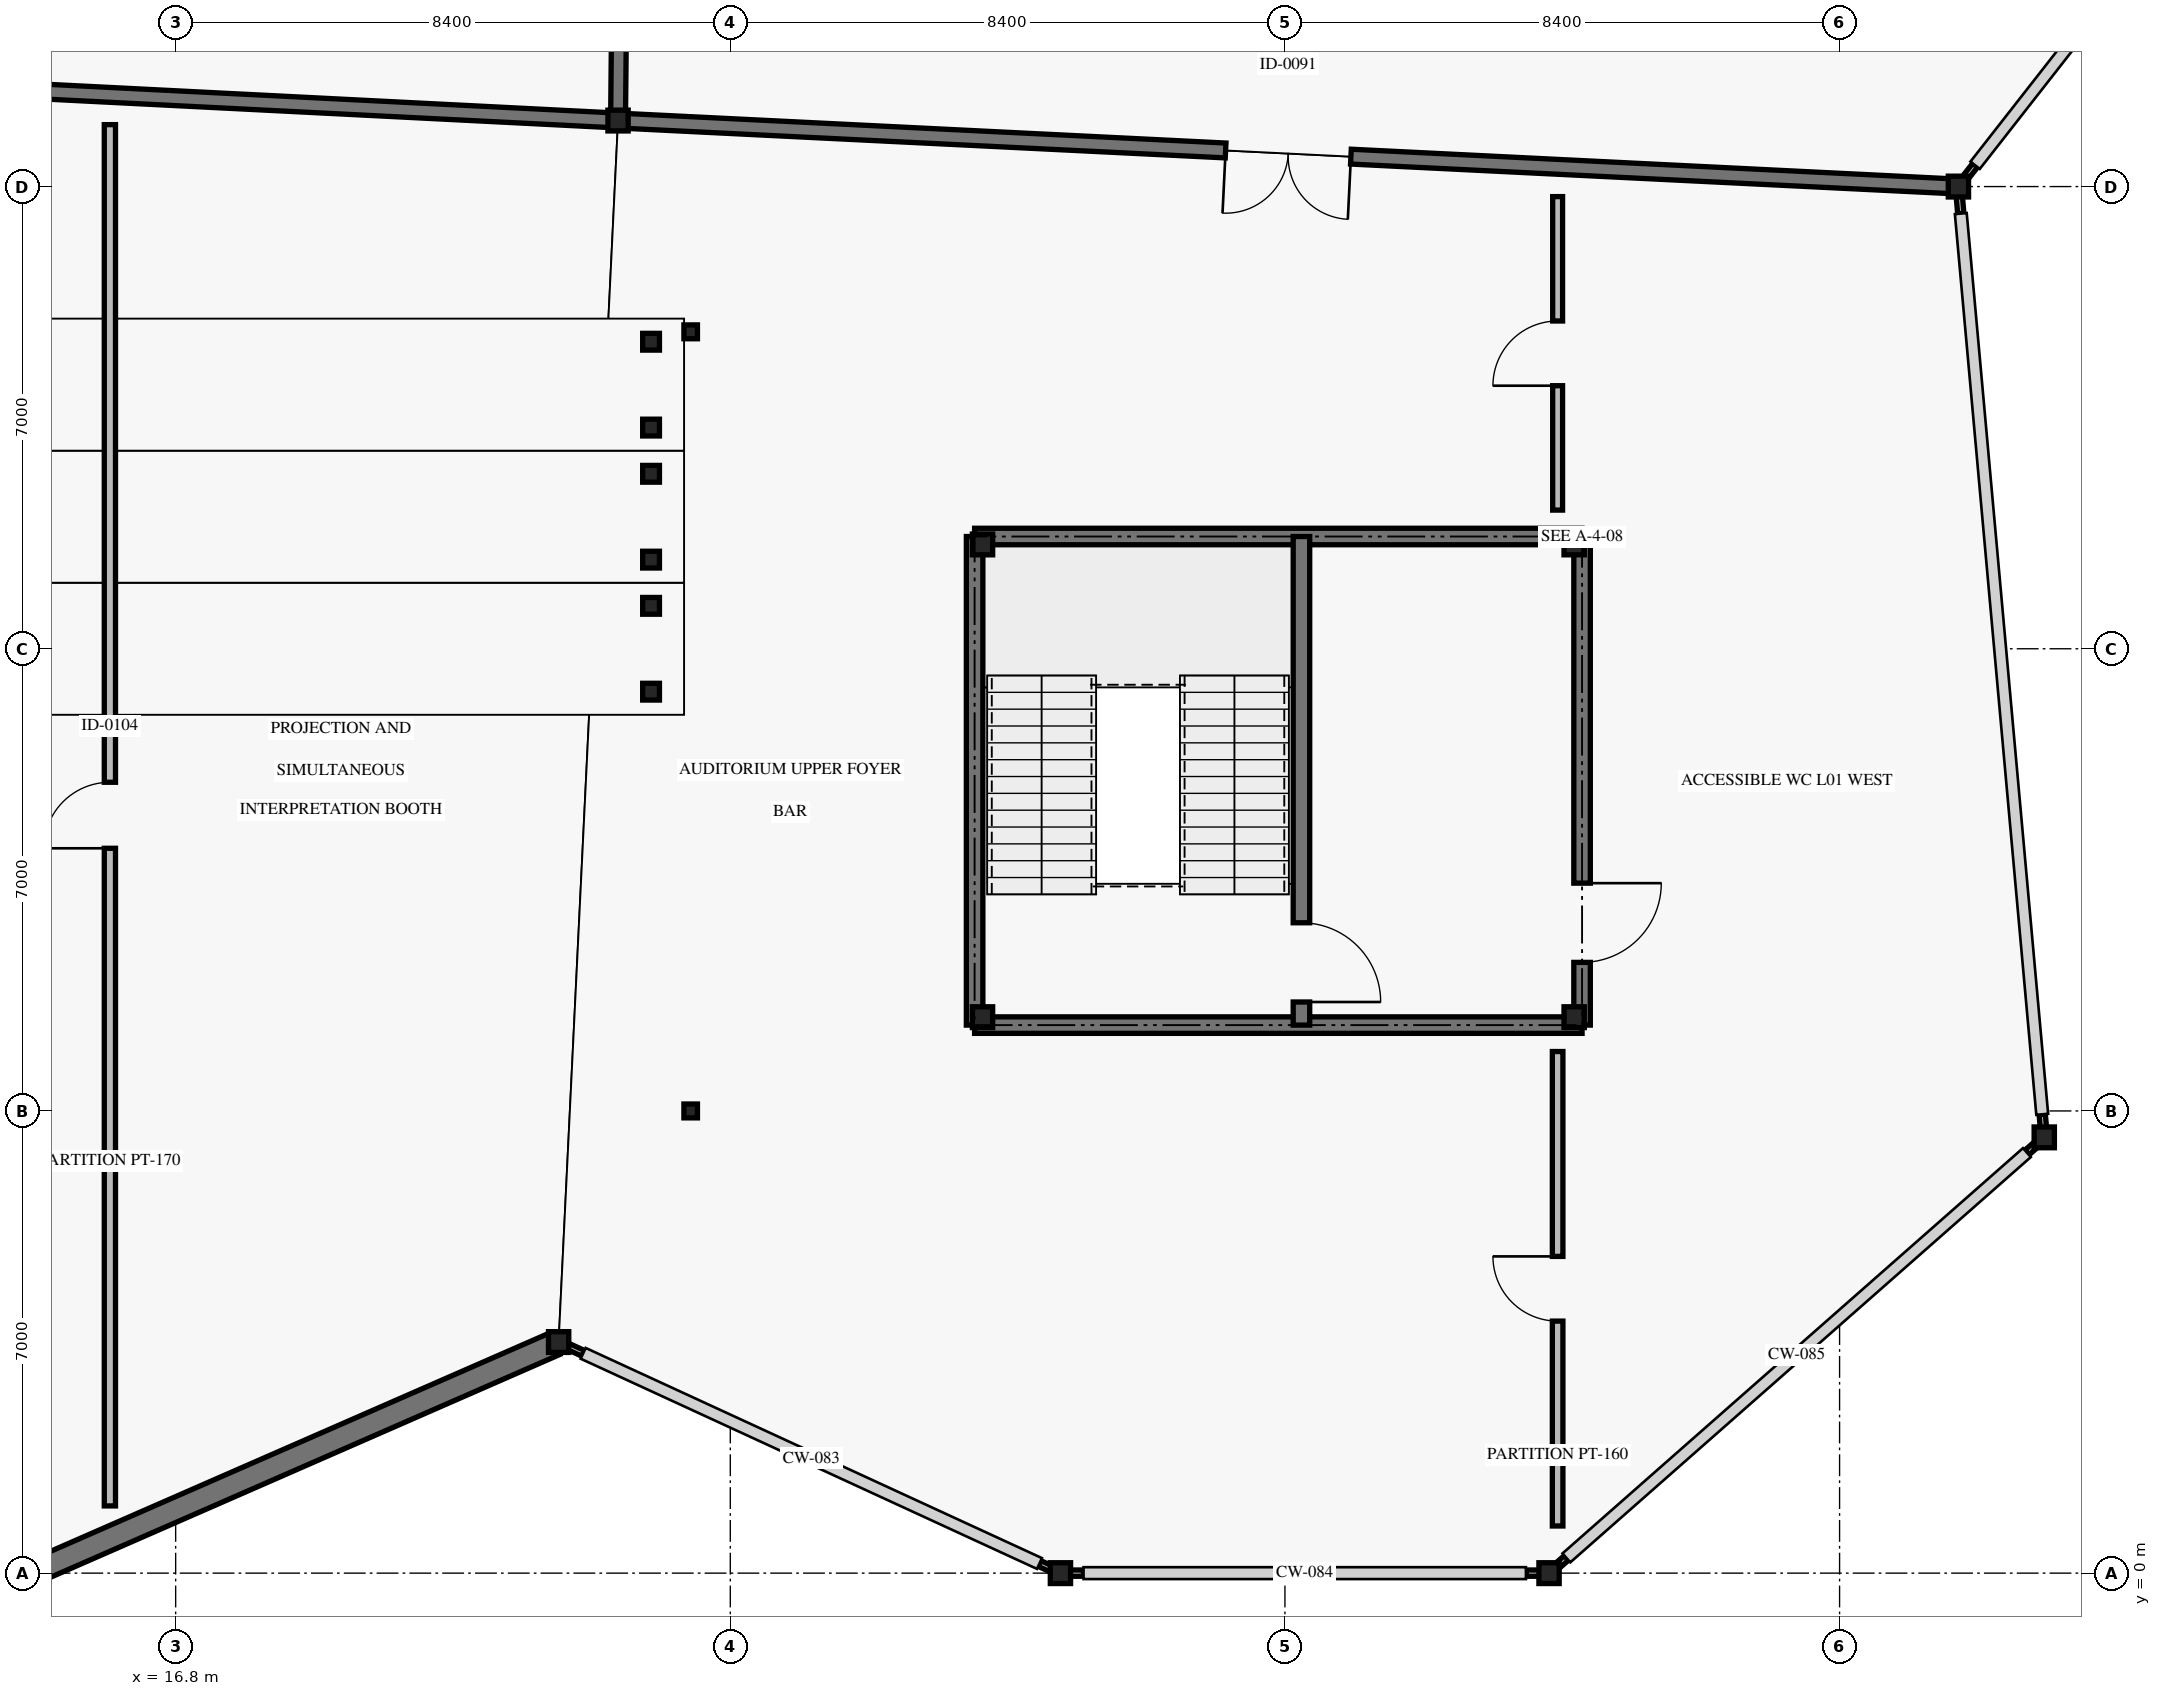
"""IFC4 building model, lengths in metres.
Left out: names, types, materials, properties, quantities, classifications, styles, units other than length and angle.
Written with IfcOpenShell. Run it as: python <this file> out.ifc"""

import sys

from ifc_helpers import new_model, si_unit, direction, frame, frame_2d, origin, origin_2d, place, context, subcontext, project, spatial, rectangle, i_section, extrude, element, fill, save


model = new_model("IFC4")
c1 = context("Model", 3, precision=1e-05, world=origin(), true_north=direction((0.0, 1.0)))
c2 = subcontext(c1, "Body", "Model", "MODEL_VIEW")
j1 = project(units=[si_unit("LENGTHUNIT", "METRE"), si_unit("PLANEANGLEUNIT", "RADIAN")], contexts=[c1])
p1 = place(None, origin())
s1 = spatial("IfcSite", under=j1, at=p1, CompositionType="ELEMENT")
p2 = place(p1, origin())
s2 = spatial("IfcBuilding", under=s1, at=p2, CompositionType="ELEMENT")
p3 = place(p2, frame((0.0, 0.0, 5.4)))
s3 = spatial("IfcBuildingStorey", under=s2, at=p3, CompositionType="ELEMENT", Elevation=5.4)
for number, where, z_axis, x_axis in (
    (1, (22.6, 3.5, 0.0), (0.0, 0.0, 1.0), (1.0, 0.0, 0.0)),
    (2, (23.5, 22.0, 0.0), (0.0, 0.0, 1.0), (1.0, 0.0, 0.0)),
    (3, (30.2, 0.0, 0.0), (0.0, 0.0, 1.0), (1.0, 0.0, 0.0)),
    (4, (37.6, 0.0, 0.0), (0.0, 0.0, 1.0), (1.0, 0.0, 0.0)),
    (5, (43.8, 21.0, 0.0), (0.0, 0.0, 1.0), (1.0, 0.0, 0.0)),
    (6, (45.1, 6.6, 0.0), (0.0, 0.0, 1.0), (1.0, 0.0, 0.0)),
    (7, (29.02, 8.42, 0.0), (0.0, 0.0, 1.0), (1.0, 0.0, 0.0)),
    (8, (37.98, 8.42, 0.0), (0.0, 0.0, 1.0), (1.0, 0.0, 0.0)),
    (9, (37.98, 15.58, 0.0), (0.0, 0.0, 1.0), (1.0, 0.0, 0.0)),
    (10, (29.02, 15.58, 0.0), (0.0, 0.0, 1.0), (1.0, 0.0, 0.0)),
):
    element("IfcColumn", number, at=place(p3, frame(where, z_axis=z_axis, x_axis=x_axis)), inside=s3, PredefinedType="COLUMN", context=c2, shape_type="SweptSolid", body=[
        extrude(i_section(OverallWidth=0.307, OverallDepth=0.315, WebThickness=0.012, FlangeThickness=0.019, FilletRadius=0.017, at=origin_2d()), origin(), (0.0, 0.0, 1.0), 4.8),
    ])
for number, where, z_axis, x_axis in (
    (11, (24.6, 7.0, 0.0), (0.0, 0.0, 1.0), (1.0, 0.0, 0.0)),
    (12, (24.6, 18.8, 0.0), (0.0, 0.0, 1.0), (1.0, 0.0, 0.0)),
):
    element("IfcColumn", number, at=place(p3, frame(where, z_axis=z_axis, x_axis=x_axis)), inside=s3, PredefinedType="COLUMN", context=c2, shape_type="SweptSolid", body=[
        extrude(i_section(OverallWidth=0.205, OverallDepth=0.21, WebThickness=0.009, FlangeThickness=0.014, FilletRadius=0.01, at=origin_2d()), origin(), (0.0, 0.0, 1.0), 4.8),
    ])
for number, where, z_axis, x_axis in (
    (13, (24.0, 13.35, 0.0), (0.0, 0.0, 1.0), (1.0, 0.0, 0.0)),
    (14, (24.0, 14.65, 0.0), (0.0, 0.0, 1.0), (1.0, 0.0, 0.0)),
):
    element("IfcColumn", number, at=place(p3, frame(where, z_axis=z_axis, x_axis=x_axis)), inside=s3, PredefinedType="COLUMN", context=c2, shape_type="SweptSolid", body=[
        extrude(i_section(OverallWidth=0.254, OverallDepth=0.254, WebThickness=0.009, FlangeThickness=0.014, FilletRadius=0.013, at=origin_2d()), origin(), (0.0, 0.0, 1.0), 0.295),
    ])
for number, where, z_axis, x_axis in (
    (15, (24.0, 15.35, 0.0), (0.0, 0.0, 1.0), (1.0, 0.0, 0.0)),
    (16, (24.0, 16.65, 0.0), (0.0, 0.0, 1.0), (1.0, 0.0, 0.0)),
):
    element("IfcColumn", number, at=place(p3, frame(where, z_axis=z_axis, x_axis=x_axis)), inside=s3, PredefinedType="COLUMN", context=c2, shape_type="SweptSolid", body=[
        extrude(i_section(OverallWidth=0.254, OverallDepth=0.254, WebThickness=0.009, FlangeThickness=0.014, FilletRadius=0.013, at=origin_2d()), origin(), (0.0, 0.0, 1.0), 0.745),
    ])
for number, where, z_axis, x_axis in (
    (17, (24.0, 17.35, 0.0), (0.0, 0.0, 1.0), (1.0, 0.0, 0.0)),
    (18, (24.0, 18.65, 0.0), (0.0, 0.0, 1.0), (1.0, 0.0, 0.0)),
):
    element("IfcColumn", number, at=place(p3, frame(where, z_axis=z_axis, x_axis=x_axis)), inside=s3, PredefinedType="COLUMN", context=c2, shape_type="SweptSolid", body=[
        extrude(i_section(OverallWidth=0.254, OverallDepth=0.254, WebThickness=0.009, FlangeThickness=0.014, FilletRadius=0.013, at=origin_2d()), origin(), (0.0, 0.0, 1.0), 1.195),
    ])
p4 = place(p3, frame((22.545, 3.476, 0.0), z_axis=(0.0, 0.0, 1.0), x_axis=(-0.916148288852, -0.400839510069, 0.0)))
e19 = element("IfcWall", 19, at=p4, inside=s3, PredefinedType="SOLIDWALL", context=c2, shape_type="SweptSolid", body=[
    extrude(rectangle(XDim=8.672, YDim=0.36, at=frame_2d((4.336, 0.0))), origin(), (0.0, 0.0, 1.0), 3.62),
])
for number, where, z_axis, x_axis in (
    (20, (30.162, 0.018, 0.0), (0.0, 0.0, 1.0), (-0.91, 0.416, 0.0)),
    (21, (22.972, 3.329, 0.0), (0.0, 0.0, 1.0), (-0.91, 0.416, 0.0)),
):
    element("IfcWall", number, at=place(p3, frame(where, z_axis=z_axis, x_axis=x_axis)), inside=s3, PredefinedType="SOLIDWALL", context=c2, shape_type="SweptSolid", body=[
        extrude(rectangle(XDim=0.308, YDim=0.095, at=frame_2d((0.154, 0.0))), origin(), (0.0, 0.0, 1.0), 3.62),
    ])
for number, where, z_axis, x_axis in (
    (22, (37.558, 0.0, 0.0), (0.0, 0.0, 1.0), (-1.0, 0.0, 0.0)),
    (23, (30.55, 0.0, 0.0), (0.0, 0.0, 1.0), (-1.0, 0.0, 0.0)),
):
    element("IfcWall", number, at=place(p3, frame(where, z_axis=z_axis, x_axis=x_axis)), inside=s3, PredefinedType="SOLIDWALL", context=c2, shape_type="SweptSolid", body=[
        extrude(rectangle(XDim=0.308, YDim=0.095, at=frame_2d((0.154, 0.0))), origin(), (0.0, 0.0, 1.0), 3.62),
    ])
p5 = place(p3, frame((45.068, 6.572, 0.0), z_axis=(0.0, 0.0, 1.0), x_axis=(-0.75124833206, -0.660019653932, 0.0)))
e24 = element("IfcWall", 24, at=p5, inside=s3, PredefinedType="SOLIDWALL", context=c2, shape_type="SweptSolid", body=[
    extrude(rectangle(XDim=0.308, YDim=0.095, at=frame_2d((0.154, 0.0))), origin(), (0.0, 0.0, 1.0), 3.62),
])
p6 = place(p3, frame((37.863, 0.231, 0.0), z_axis=(0.0, 0.0, 1.0), x_axis=(-0.751296149946, -0.659965222627, 0.0)))
e25 = element("IfcWall", 25, at=p6, inside=s3, PredefinedType="SOLIDWALL", context=c2, shape_type="SweptSolid", body=[
    extrude(rectangle(XDim=0.307, YDim=0.095, at=frame_2d((0.154, 0.0))), origin(), (0.0, 0.0, 1.0), 3.62),
])
for number, where, z_axis, x_axis in (
    (26, (43.809, 20.898, 0.0), (0.0, 0.0, 1.0), (0.087, -0.996, 0.0)),
    (27, (45.069, 6.949, 0.0), (0.0, 0.0, 1.0), (0.087, -0.996, 0.0)),
):
    element("IfcWall", number, at=place(p3, frame(where, z_axis=z_axis, x_axis=x_axis)), inside=s3, PredefinedType="SOLIDWALL", context=c2, shape_type="SweptSolid", body=[
        extrude(rectangle(XDim=0.308, YDim=0.095, at=frame_2d((0.154, 0.0))), origin(), (0.0, 0.0, 1.0), 3.62),
    ])
p7 = place(p3, frame((44.053, 21.323, 0.0), z_axis=(0.0, 0.0, 1.0), x_axis=(-0.615966636313, -0.787772240529, 0.0)))
e28 = element("IfcWall", 28, at=p7, inside=s3, PredefinedType="SOLIDWALL", context=c2, shape_type="SweptSolid", body=[
    extrude(rectangle(XDim=0.308, YDim=0.095, at=frame_2d((0.154, 0.0))), origin(), (0.0, 0.0, 1.0), 3.62),
])
p8 = place(p3, frame((23.5, 22.0, 0.0), z_axis=(0.0, 0.0, 1.0), x_axis=(-0.99872706092, 0.050440636263, 0.0)))
e29 = element("IfcWall", 29, at=p8, inside=s3, PredefinedType="SOLIDWALL", context=c2, shape_type="SweptSolid", body=[
    extrude(rectangle(XDim=19.825, YDim=0.225, at=frame_2d((9.913, 0.0))), origin(), (0.0, 0.0, 1.0), 4.02),
])
p9 = place(p8, frame((8.963, 0.0, 0.0)))
e30 = element("IfcOpeningElement", 30, at=p9, cuts=e29, PredefinedType="OPENING", context=c2, shape_type="SweptSolid", body=[
    extrude(rectangle(XDim=1.9, YDim=2.35, at=frame_2d((0.95, 1.175))), frame((0.0, 0.123, 0.0), z_axis=(0.0, -1.0, 0.0), x_axis=(1.0, 0.0, 0.0)), (0.0, 0.0, 1.0), 0.245),
])
p10 = place(p3, frame((43.8, 21.0, 0.0), z_axis=(0.0, 0.0, 1.0), x_axis=(-0.998788882418, 0.049201304434, 0.0)))
e31 = element("IfcWall", 31, at=p10, inside=s3, PredefinedType="SOLIDWALL", context=c2, shape_type="SweptSolid", body=[
    extrude(rectangle(XDim=20.325, YDim=0.225, at=frame_2d((10.162, 0.0))), origin(), (0.0, 0.0, 1.0), 4.02),
])
p11 = place(p10, frame((9.212, 0.0, 0.0)))
e32 = element("IfcOpeningElement", 32, at=p11, cuts=e31, PredefinedType="OPENING", context=c2, shape_type="SweptSolid", body=[
    extrude(rectangle(XDim=1.9, YDim=2.35, at=frame_2d((0.95, 1.175))), frame((0.0, 0.123, 0.0), z_axis=(0.0, -1.0, 0.0), x_axis=(1.0, 0.0, 0.0)), (0.0, 0.0, 1.0), 0.245),
])
p12 = place(p3, frame((23.5, 22.0, 0.0), z_axis=(0.0, 0.0, 1.0), x_axis=(0.009521052802, 0.99995467375, 0.0)))
e33 = element("IfcWall", 33, at=p12, inside=s3, PredefinedType="SOLIDWALL", context=c2, shape_type="SweptSolid", body=[
    extrude(rectangle(XDim=21.001, YDim=0.225, at=frame_2d((10.5, 0.0))), origin(), (0.0, 0.0, 1.0), 4.02),
])
p13 = place(p12, frame((9.575, 0.0, 0.0)))
e34 = element("IfcOpeningElement", 34, at=p13, cuts=e33, PredefinedType="OPENING", context=c2, shape_type="SweptSolid", body=[
    extrude(rectangle(XDim=1.85, YDim=2.4, at=frame_2d((0.925, 1.2))), frame((0.0, 0.123, 0.0), z_axis=(0.0, -1.0, 0.0), x_axis=(1.0, 0.0, 0.0)), (0.0, 0.0, 1.0), 0.245),
])
p14 = place(p3, frame((15.804, 1.018, 0.0), z_axis=(0.0, 0.0, 1.0), x_axis=(0.0, 1.0, 0.0)))
e35 = element("IfcWall", 35, at=p14, inside=s3, PredefinedType="PARTITIONING", context=c2, shape_type="SweptSolid", body=[
    extrude(rectangle(XDim=20.92, YDim=0.17, at=frame_2d((10.46, 0.0))), origin(), (0.0, 0.0, 1.0), 3.32),
])
p15 = place(p14, frame((9.96, 0.0, 0.0)))
e36 = element("IfcOpeningElement", 36, at=p15, cuts=e35, PredefinedType="OPENING", context=c2, shape_type="SweptSolid", body=[
    extrude(rectangle(XDim=1.0, YDim=2.15, at=frame_2d((0.5, 1.075))), frame((0.0, 0.095, 0.0), z_axis=(0.0, -1.0, 0.0), x_axis=(1.0, 0.0, 0.0)), (0.0, 0.0, 1.0), 0.19),
])
p16 = place(p3, frame((37.73, 0.714, 0.0), z_axis=(0.0, 0.0, 1.0), x_axis=(0.0, 1.0, 0.0)))
e37 = element("IfcWall", 37, at=p16, inside=s3, PredefinedType="PARTITIONING", context=c2, shape_type="SweptSolid", body=[
    extrude(rectangle(XDim=7.186, YDim=0.16, at=frame_2d((3.593, 0.0))), origin(), (0.0, 0.0, 1.0), 3.32),
])
p17 = place(p16, frame((3.103, 0.0, 0.0)))
e38 = element("IfcOpeningElement", 38, at=p17, cuts=e37, PredefinedType="OPENING", context=c2, shape_type="SweptSolid", body=[
    extrude(rectangle(XDim=0.98, YDim=2.15, at=frame_2d((0.49, 1.075))), frame((0.0, 0.09, 0.0), z_axis=(0.0, -1.0, 0.0), x_axis=(1.0, 0.0, 0.0)), (0.0, 0.0, 1.0), 0.18),
])
p18 = place(p3, frame((37.73, 16.1, 0.0), z_axis=(0.0, 0.0, 1.0), x_axis=(0.0, 1.0, 0.0)))
e39 = element("IfcWall", 39, at=p18, inside=s3, PredefinedType="PARTITIONING", context=c2, shape_type="SweptSolid", body=[
    extrude(rectangle(XDim=4.748, YDim=0.15, at=frame_2d((2.374, 0.0))), origin(), (0.0, 0.0, 1.0), 3.32),
])
p19 = place(p18, frame((1.884, 0.0, 0.0)))
e40 = element("IfcOpeningElement", 40, at=p19, cuts=e39, PredefinedType="OPENING", context=c2, shape_type="SweptSolid", body=[
    extrude(rectangle(XDim=0.98, YDim=2.15, at=frame_2d((0.49, 1.075))), frame((0.0, 0.085, 0.0), z_axis=(0.0, -1.0, 0.0), x_axis=(1.0, 0.0, 0.0)), (0.0, 0.0, 1.0), 0.17),
])
p20 = place(p3, frame((28.9, 8.3, 0.0), z_axis=(0.0, 0.0, 1.0), x_axis=(0.0, 1.0, 0.0)))
e41 = element("IfcWall", 41, at=p20, inside=s3, PredefinedType="SHEAR", context=c2, shape_type="SweptSolid", body=[
    extrude(rectangle(XDim=7.4, YDim=0.25, at=frame_2d((3.7, 0.0))), origin(), (0.0, 0.0, 1.0), 4.56),
])
for number, where, z_axis, x_axis in (
    (42, (28.9, 15.7, 0.0), (0.0, 0.0, 1.0), (1.0, 0.0, 0.0)),
    (43, (38.1, 8.3, 0.0), (0.0, 0.0, 1.0), (-1.0, 0.0, 0.0)),
):
    element("IfcWall", number, at=place(p3, frame(where, z_axis=z_axis, x_axis=x_axis)), inside=s3, PredefinedType="SHEAR", context=c2, shape_type="SweptSolid", body=[
        extrude(rectangle(XDim=9.2, YDim=0.25, at=frame_2d((4.6, 0.0))), origin(), (0.0, 0.0, 1.0), 4.56),
    ])
p21 = place(p3, frame((38.1, 15.7, 0.0), z_axis=(0.0, 0.0, 1.0), x_axis=(0.0, -1.0, 0.0)))
e44 = element("IfcWall", 44, at=p21, inside=s3, PredefinedType="SHEAR", context=c2, shape_type="SweptSolid", body=[
    extrude(rectangle(XDim=7.4, YDim=0.25, at=frame_2d((3.7, 0.0))), origin(), (0.0, 0.0, 1.0), 4.56),
])
p22 = place(p21, frame((5.25, 0.0, 0.0)))
e45 = element("IfcOpeningElement", 45, at=p22, cuts=e44, PredefinedType="OPENING", context=c2, shape_type="SweptSolid", body=[
    extrude(rectangle(XDim=1.2, YDim=2.2, at=frame_2d((0.6, 1.1))), frame((0.0, 0.135, 0.0), z_axis=(0.0, -1.0, 0.0), x_axis=(1.0, 0.0, 0.0)), (0.0, 0.0, 1.0), 0.27),
])
p23 = place(p3, frame((33.85, 15.7, 0.0), z_axis=(0.0, 0.0, 1.0), x_axis=(0.0, -1.0, 0.0)))
e46 = element("IfcWall", 46, at=p23, inside=s3, PredefinedType="SHEAR", context=c2, shape_type="SweptSolid", body=[
    extrude(rectangle(XDim=7.4, YDim=0.25, at=frame_2d((3.7, 0.0))), origin(), (0.0, 0.0, 1.0), 4.56),
])
p24 = place(p23, frame((5.85, 0.0, 0.0)))
e47 = element("IfcOpeningElement", 47, at=p24, cuts=e46, PredefinedType="OPENING", context=c2, shape_type="SweptSolid", body=[
    extrude(rectangle(XDim=1.2, YDim=2.2, at=frame_2d((0.6, 1.1))), frame((0.0, 0.135, 0.0), z_axis=(0.0, -1.0, 0.0), x_axis=(1.0, 0.0, 0.0)), (0.0, 0.0, 1.0), 0.27),
])
p25 = place(p11, origin())
e48 = element("IfcDoor", 48, at=p25, inside=s3, OperationType="DOUBLE_DOOR_SINGLE_SWING", PredefinedType="DOOR", context=c2, shape_type="SweptSolid", body=[
    extrude(rectangle(XDim=1.9, YDim=2.35, at=frame_2d((0.95, 1.175))), frame((0.0, 0.025, 0.0), z_axis=(0.0, -1.0, 0.0), x_axis=(1.0, 0.0, 0.0)), (0.0, 0.0, 1.0), 0.05),
])
fill(e32, e48)
p26 = place(p15, origin())
e49 = element("IfcDoor", 49, at=p26, inside=s3, OperationType="SINGLE_SWING_LEFT", PredefinedType="DOOR", context=c2, shape_type="SweptSolid", body=[
    extrude(rectangle(XDim=1.0, YDim=2.15, at=frame_2d((0.5, 1.075))), frame((0.0, 0.025, 0.0), z_axis=(0.0, -1.0, 0.0), x_axis=(1.0, 0.0, 0.0)), (0.0, 0.0, 1.0), 0.05),
])
fill(e36, e49)
p27 = place(p17, origin())
e50 = element("IfcDoor", 50, at=p27, inside=s3, OperationType="SINGLE_SWING_RIGHT", PredefinedType="DOOR", context=c2, shape_type="SweptSolid", body=[
    extrude(rectangle(XDim=0.98, YDim=2.15, at=frame_2d((0.49, 1.075))), frame((0.0, 0.025, 0.0), z_axis=(0.0, -1.0, 0.0), x_axis=(1.0, 0.0, 0.0)), (0.0, 0.0, 1.0), 0.05),
])
fill(e38, e50)
p28 = place(p19, origin())
e51 = element("IfcDoor", 51, at=p28, inside=s3, OperationType="SINGLE_SWING_LEFT", PredefinedType="DOOR", context=c2, shape_type="SweptSolid", body=[
    extrude(rectangle(XDim=0.98, YDim=2.15, at=frame_2d((0.49, 1.075))), frame((0.0, 0.025, 0.0), z_axis=(0.0, -1.0, 0.0), x_axis=(1.0, 0.0, 0.0)), (0.0, 0.0, 1.0), 0.05),
])
fill(e40, e51)
p29 = place(p22, origin())
e52 = element("IfcDoor", 52, at=p29, inside=s3, OperationType="SINGLE_SWING_LEFT", PredefinedType="DOOR", context=c2, shape_type="SweptSolid", body=[
    extrude(rectangle(XDim=1.2, YDim=2.2, at=frame_2d((0.6, 1.1))), frame((0.0, 0.025, 0.0), z_axis=(0.0, -1.0, 0.0), x_axis=(1.0, 0.0, 0.0)), (0.0, 0.0, 1.0), 0.05),
])
fill(e45, e52)
p30 = place(p24, origin())
e53 = element("IfcDoor", 53, at=p30, inside=s3, OperationType="SINGLE_SWING_RIGHT", PredefinedType="DOOR", context=c2, shape_type="SweptSolid", body=[
    extrude(rectangle(XDim=1.2, YDim=2.2, at=frame_2d((0.6, 1.1))), frame((0.0, 0.025, 0.0), z_axis=(0.0, -1.0, 0.0), x_axis=(1.0, 0.0, 0.0)), (0.0, 0.0, 1.0), 0.05),
])
fill(e47, e53)
save(model, sys.argv[1])
